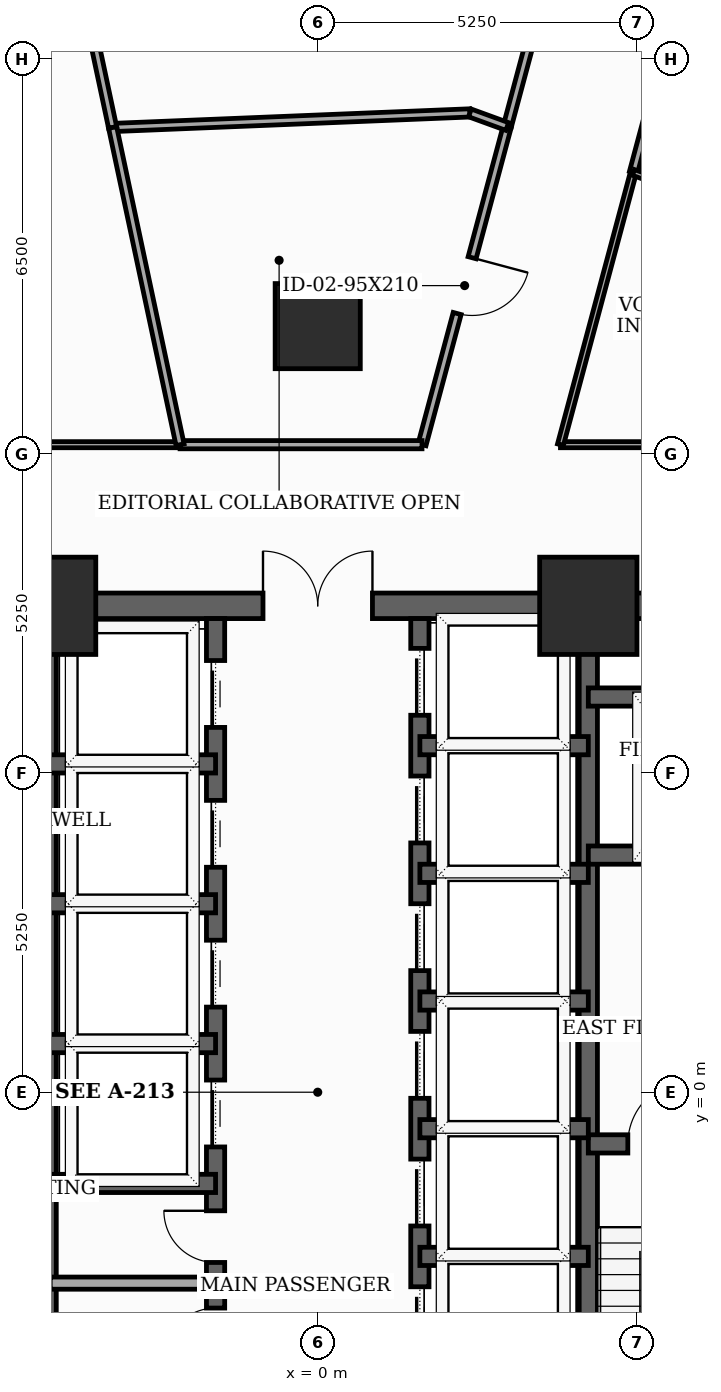
"""IFC4 building model, lengths in metres.
Left out: names, types, materials, properties, quantities, classifications, styles, units other than length and angle.
Written with IfcOpenShell. Run it as: python <this file> out.ifc"""

import sys

from ifc_helpers import new_model, si_unit, direction, frame, frame_2d, origin, origin_2d, place, context, subcontext, project, spatial, rectangle, extrude, element, fill, save


model = new_model("IFC4")
c1 = context("Model", 3, precision=1e-05, world=origin(), true_north=direction((0.0, 1.0)))
c2 = subcontext(c1, "Body", "Model", "MODEL_VIEW")
j1 = project(units=[si_unit("LENGTHUNIT", "METRE"), si_unit("PLANEANGLEUNIT", "RADIAN")], contexts=[c1])
p1 = place(None, origin())
s1 = spatial("IfcSite", under=j1, at=p1, CompositionType="ELEMENT")
p2 = place(p1, origin())
s2 = spatial("IfcBuilding", under=s1, at=p2, CompositionType="ELEMENT")
p3 = place(p2, frame((0.0, 0.0, 51.9)))
s3 = spatial("IfcBuildingStorey", under=s2, at=p3, CompositionType="ELEMENT", Elevation=51.9)
for number, where, z_axis, x_axis in (
    (1, (4.45, 8.0, 0.0), (0.0, 0.0, 1.0), (1.0, 0.0, 0.0)),
    (2, (-4.45, 8.0, 0.0), (0.0, 0.0, 1.0), (1.0, 0.0, 0.0)),
):
    element("IfcColumn", number, at=place(p3, frame(where, z_axis=z_axis, x_axis=x_axis)), inside=s3, PredefinedType="COLUMN", context=c2, shape_type="SweptSolid", body=[
        extrude(rectangle(XDim=1.6, YDim=1.6, at=origin_2d()), origin(), (0.0, 0.0, 1.0), 3.7),
    ])
p4 = place(p3, frame((0.0, 12.6, 0.0), z_axis=(0.0, 0.0, 1.0), x_axis=(1.0, 0.0, 0.0)))
e3 = element("IfcColumn", 3, at=p4, inside=s3, PredefinedType="COLUMN", context=c2, shape_type="SweptSolid", body=[
    extrude(rectangle(XDim=1.4, YDim=1.4, at=origin_2d()), origin(), (0.0, 0.0, 1.0), 3.7),
])
p5 = place(p3, frame((-8.0, 8.0, 0.0), z_axis=(0.0, 0.0, 1.0), x_axis=(1.0, 0.0, 0.0)))
e4 = element("IfcWall", 4, at=p5, inside=s3, PredefinedType="SHEAR", context=c2, shape_type="SweptSolid", body=[
    extrude(rectangle(XDim=16.0, YDim=0.42, at=frame_2d((8.0, 0.0))), origin(), (0.0, 0.0, 1.0), 3.5),
])
p6 = place(p5, frame((7.1, 0.0, 0.0)))
e5 = element("IfcOpeningElement", 5, at=p6, cuts=e4, PredefinedType="OPENING", context=c2, shape_type="SweptSolid", body=[
    extrude(rectangle(XDim=1.8, YDim=2.15, at=frame_2d((0.9, 1.075))), frame((0.0, 0.22, 0.0), z_axis=(0.0, -1.0, 0.0), x_axis=(1.0, 0.0, 0.0)), (0.0, 0.0, 1.0), 0.44),
])
for number, where, z_axis, x_axis in (
    (6, (-4.45, -7.79, 0.0), (0.0, 0.0, 1.0), (0.0, 1.0, 0.0)),
    (7, (4.45, -7.79, 0.0), (0.0, 0.0, 1.0), (0.0, 1.0, 0.0)),
):
    element("IfcWall", number, at=place(p3, frame(where, z_axis=z_axis, x_axis=x_axis)), inside=s3, PredefinedType="SHEAR", context=c2, shape_type="SweptSolid", body=[
        extrude(rectangle(XDim=15.58, YDim=0.3, at=frame_2d((7.79, 0.0))), origin(), (0.0, 0.0, 1.0), 3.5),
    ])
p7 = place(p3, frame((4.45, -0.85, 0.0), z_axis=(0.0, 0.0, 1.0), x_axis=(1.0, 0.0, 0.0)))
e8 = element("IfcWall", 8, at=p7, inside=s3, PredefinedType="SHEAR", context=c2, shape_type="SweptSolid", body=[
    extrude(rectangle(XDim=3.34, YDim=0.3, at=frame_2d((1.67, 0.0))), origin(), (0.0, 0.0, 1.0), 3.5),
])
p8 = place(p7, frame((0.65, 0.0, 0.0)))
e9 = element("IfcOpeningElement", 9, at=p8, cuts=e8, PredefinedType="OPENING", context=c2, shape_type="SweptSolid", body=[
    extrude(rectangle(XDim=1.05, YDim=2.15, at=frame_2d((0.525, 1.075))), frame((0.0, 0.16, 0.0), z_axis=(0.0, -1.0, 0.0), x_axis=(1.0, 0.0, 0.0)), (0.0, 0.0, 1.0), 0.32),
])
p9 = place(p3, frame((4.45, 3.9, 0.0), z_axis=(0.0, 0.0, 1.0), x_axis=(1.0, 0.0, 0.0)))
e10 = element("IfcWall", 10, at=p9, inside=s3, PredefinedType="SHEAR", context=c2, shape_type="SweptSolid", body=[
    extrude(rectangle(XDim=3.34, YDim=0.3, at=frame_2d((1.67, 0.0))), origin(), (0.0, 0.0, 1.0), 3.5),
])
p10 = place(p9, frame((1.18, 0.0, 0.0)))
e11 = element("IfcOpeningElement", 11, at=p10, cuts=e10, PredefinedType="OPENING", context=c2, shape_type="SweptSolid", body=[
    extrude(rectangle(XDim=1.1, YDim=2.1, at=frame_2d((0.55, 1.05))), frame((0.0, 0.16, 0.0), z_axis=(0.0, -1.0, 0.0), x_axis=(1.0, 0.0, 0.0)), (0.0, 0.0, 1.0), 0.32),
])
p11 = place(p3, frame((4.45, 6.5, 0.0), z_axis=(0.0, 0.0, 1.0), x_axis=(1.0, 0.0, 0.0)))
e12 = element("IfcWall", 12, at=p11, inside=s3, PredefinedType="SHEAR", context=c2, shape_type="SweptSolid", body=[
    extrude(rectangle(XDim=3.34, YDim=0.3, at=frame_2d((1.67, 0.0))), origin(), (0.0, 0.0, 1.0), 3.5),
])
p12 = place(p3, frame((-1.68, -4.85, 0.0), z_axis=(0.0, 0.0, 1.0), x_axis=(0.0, 1.0, 0.0)))
e13 = element("IfcWall", 13, at=p12, inside=s3, PredefinedType="SHEAR", context=c2, shape_type="SweptSolid", body=[
    extrude(rectangle(XDim=12.64, YDim=0.3, at=frame_2d((6.32, 0.0))), origin(), (0.0, 0.0, 1.0), 3.5),
])
p13 = place(p12, frame((3.95, 0.0, 0.0)))
e14 = element("IfcOpeningElement", 14, at=p13, cuts=e13, PredefinedType="OPENING", context=c2, shape_type="SweptSolid", body=[
    extrude(rectangle(XDim=1.1, YDim=2.1, at=frame_2d((0.55, 1.05))), frame((0.0, 0.16, 0.0), z_axis=(0.0, -1.0, 0.0), x_axis=(1.0, 0.0, 0.0)), (0.0, 0.0, 1.0), 0.32),
])
p14 = place(p12, frame((6.25, 0.0, 0.0)))
e15 = element("IfcOpeningElement", 15, at=p14, cuts=e13, PredefinedType="OPENING", context=c2, shape_type="SweptSolid", body=[
    extrude(rectangle(XDim=1.1, YDim=2.1, at=frame_2d((0.55, 1.05))), frame((0.0, 0.16, 0.0), z_axis=(0.0, -1.0, 0.0), x_axis=(1.0, 0.0, 0.0)), (0.0, 0.0, 1.0), 0.32),
])
p15 = place(p12, frame((8.55, 0.0, 0.0)))
e16 = element("IfcOpeningElement", 16, at=p15, cuts=e13, PredefinedType="OPENING", context=c2, shape_type="SweptSolid", body=[
    extrude(rectangle(XDim=1.1, YDim=2.1, at=frame_2d((0.55, 1.05))), frame((0.0, 0.16, 0.0), z_axis=(0.0, -1.0, 0.0), x_axis=(1.0, 0.0, 0.0)), (0.0, 0.0, 1.0), 0.32),
])
p16 = place(p12, frame((10.85, 0.0, 0.0)))
e17 = element("IfcOpeningElement", 17, at=p16, cuts=e13, PredefinedType="OPENING", context=c2, shape_type="SweptSolid", body=[
    extrude(rectangle(XDim=1.1, YDim=2.1, at=frame_2d((0.55, 1.05))), frame((0.0, 0.16, 0.0), z_axis=(0.0, -1.0, 0.0), x_axis=(1.0, 0.0, 0.0)), (0.0, 0.0, 1.0), 0.32),
])
p17 = place(p12, frame((0.45, 0.0, 0.0)))
e18 = element("IfcOpeningElement", 18, at=p17, cuts=e13, PredefinedType="OPENING", context=c2, shape_type="SweptSolid", body=[
    extrude(rectangle(XDim=0.85, YDim=2.02, at=frame_2d((0.425, 1.01))), frame((0.0, 0.16, 0.0), z_axis=(0.0, -1.0, 0.0), x_axis=(1.0, 0.0, 0.0)), (0.0, 0.0, 1.0), 0.32),
])
p18 = place(p12, frame((2.05, 0.0, 0.0)))
e19 = element("IfcOpeningElement", 19, at=p18, cuts=e13, PredefinedType="OPENING", context=c2, shape_type="SweptSolid", body=[
    extrude(rectangle(XDim=0.85, YDim=2.02, at=frame_2d((0.425, 1.01))), frame((0.0, 0.16, 0.0), z_axis=(0.0, -1.0, 0.0), x_axis=(1.0, 0.0, 0.0)), (0.0, 0.0, 1.0), 0.32),
])
p19 = place(p3, frame((1.68, -4.85, 0.0), z_axis=(0.0, 0.0, 1.0), x_axis=(0.0, 1.0, 0.0)))
e20 = element("IfcWall", 20, at=p19, inside=s3, PredefinedType="SHEAR", context=c2, shape_type="SweptSolid", body=[
    extrude(rectangle(XDim=12.64, YDim=0.3, at=frame_2d((6.32, 0.0))), origin(), (0.0, 0.0, 1.0), 3.5),
])
p20 = place(p19, frame((0.55, 0.0, 0.0)))
e21 = element("IfcOpeningElement", 21, at=p20, cuts=e20, PredefinedType="OPENING", context=c2, shape_type="SweptSolid", body=[
    extrude(rectangle(XDim=1.1, YDim=2.1, at=frame_2d((0.55, 1.05))), frame((0.0, 0.16, 0.0), z_axis=(0.0, -1.0, 0.0), x_axis=(1.0, 0.0, 0.0)), (0.0, 0.0, 1.0), 0.32),
])
p21 = place(p19, frame((2.65, 0.0, 0.0)))
e22 = element("IfcOpeningElement", 22, at=p21, cuts=e20, PredefinedType="OPENING", context=c2, shape_type="SweptSolid", body=[
    extrude(rectangle(XDim=1.1, YDim=2.1, at=frame_2d((0.55, 1.05))), frame((0.0, 0.16, 0.0), z_axis=(0.0, -1.0, 0.0), x_axis=(1.0, 0.0, 0.0)), (0.0, 0.0, 1.0), 0.32),
])
p22 = place(p19, frame((4.75, 0.0, 0.0)))
e23 = element("IfcOpeningElement", 23, at=p22, cuts=e20, PredefinedType="OPENING", context=c2, shape_type="SweptSolid", body=[
    extrude(rectangle(XDim=1.1, YDim=2.1, at=frame_2d((0.55, 1.05))), frame((0.0, 0.16, 0.0), z_axis=(0.0, -1.0, 0.0), x_axis=(1.0, 0.0, 0.0)), (0.0, 0.0, 1.0), 0.32),
])
p23 = place(p19, frame((6.85, 0.0, 0.0)))
e24 = element("IfcOpeningElement", 24, at=p23, cuts=e20, PredefinedType="OPENING", context=c2, shape_type="SweptSolid", body=[
    extrude(rectangle(XDim=1.1, YDim=2.1, at=frame_2d((0.55, 1.05))), frame((0.0, 0.16, 0.0), z_axis=(0.0, -1.0, 0.0), x_axis=(1.0, 0.0, 0.0)), (0.0, 0.0, 1.0), 0.32),
])
p24 = place(p19, frame((8.95, 0.0, 0.0)))
e25 = element("IfcOpeningElement", 25, at=p24, cuts=e20, PredefinedType="OPENING", context=c2, shape_type="SweptSolid", body=[
    extrude(rectangle(XDim=1.1, YDim=2.1, at=frame_2d((0.55, 1.05))), frame((0.0, 0.16, 0.0), z_axis=(0.0, -1.0, 0.0), x_axis=(1.0, 0.0, 0.0)), (0.0, 0.0, 1.0), 0.32),
])
p25 = place(p19, frame((11.05, 0.0, 0.0)))
e26 = element("IfcOpeningElement", 26, at=p25, cuts=e20, PredefinedType="OPENING", context=c2, shape_type="SweptSolid", body=[
    extrude(rectangle(XDim=1.1, YDim=2.1, at=frame_2d((0.55, 1.05))), frame((0.0, 0.16, 0.0), z_axis=(0.0, -1.0, 0.0), x_axis=(1.0, 0.0, 0.0)), (0.0, 0.0, 1.0), 0.32),
])
for number, where, z_axis, x_axis in (
    (27, (-4.45, -1.5, 0.0), (0.0, 0.0, 1.0), (1.0, 0.0, 0.0)),
    (28, (-4.45, 0.8, 0.0), (0.0, 0.0, 1.0), (1.0, 0.0, 0.0)),
    (29, (-4.45, 3.1, 0.0), (0.0, 0.0, 1.0), (1.0, 0.0, 0.0)),
    (30, (-4.45, 5.4, 0.0), (0.0, 0.0, 1.0), (1.0, 0.0, 0.0)),
    (31, (1.68, 1.5, 0.0), (0.0, 0.0, 1.0), (1.0, 0.0, 0.0)),
    (32, (1.68, 3.6, 0.0), (0.0, 0.0, 1.0), (1.0, 0.0, 0.0)),
    (33, (1.68, 5.7, 0.0), (0.0, 0.0, 1.0), (1.0, 0.0, 0.0)),
    (34, (1.68, -2.7, 0.0), (0.0, 0.0, 1.0), (1.0, 0.0, 0.0)),
    (35, (1.68, -0.6, 0.0), (0.0, 0.0, 1.0), (1.0, 0.0, 0.0)),
):
    element("IfcWall", number, at=place(p3, frame(where, z_axis=z_axis, x_axis=x_axis)), inside=s3, PredefinedType="SHEAR", context=c2, shape_type="SweptSolid", body=[
        extrude(rectangle(XDim=2.77, YDim=0.3, at=frame_2d((1.385, 0.0))), origin(), (0.0, 0.0, 1.0), 3.5),
    ])
p26 = place(p3, frame((-4.4, -3.14, 0.0), z_axis=(0.0, 0.0, 1.0), x_axis=(1.0, 0.0, 0.0)))
e36 = element("IfcWall", 36, at=p26, inside=s3, PredefinedType="SOLIDWALL", context=c2, shape_type="SweptSolid", body=[
    extrude(rectangle(XDim=2.68, YDim=0.2, at=frame_2d((1.34, 0.0))), origin(), (0.0, 0.0, 1.0), 3.5),
])
p27 = place(p3, frame((10.15, 10.65, 0.0), z_axis=(0.0, 0.0, 1.0), x_axis=(-1.0, 0.0, 0.0)))
e37 = element("IfcWall", 37, at=p27, inside=s3, PredefinedType="MOVABLE", context=c2, shape_type="SweptSolid", body=[
    extrude(rectangle(XDim=6.158, YDim=0.1, at=frame_2d((3.079, 0.0))), origin(), (0.0, 0.0, 1.0), 2.085),
])
p28 = place(p27, frame((0.757, 0.0, 0.0)))
e38 = element("IfcOpeningElement", 38, at=p28, cuts=e37, PredefinedType="OPENING", context=c2, shape_type="SweptSolid", body=[
    extrude(rectangle(XDim=0.95, YDim=2.035, at=frame_2d((0.475, 1.018))), frame((0.0, 0.06, 0.0), z_axis=(0.0, -1.0, 0.0), x_axis=(1.0, 0.0, 0.0)), (0.0, 0.0, 1.0), 0.12),
])
p29 = place(p3, frame((3.992, 10.65, 0.0), z_axis=(0.0, 0.0, 1.0), x_axis=(0.258832601786, 0.965922193685, 0.0)))
e39 = element("IfcWall", 39, at=p29, inside=s3, PredefinedType="MOVABLE", context=c2, shape_type="SweptSolid", body=[
    extrude(rectangle(XDim=4.636, YDim=0.1, at=frame_2d((2.318, 0.0))), origin(), (0.0, 0.0, 1.0), 2.085),
])
p30 = place(p3, frame((5.192, 15.128, 0.0), z_axis=(0.0, 0.0, 1.0), x_axis=(0.258929564275, 0.965896205989, 0.0)))
e40 = element("IfcWall", 40, at=p30, inside=s3, PredefinedType="PARTITIONING", context=c2, shape_type="SweptSolid", body=[
    extrude(rectangle(XDim=6.644, YDim=0.135, at=frame_2d((3.322, 0.0))), origin(), (0.0, 0.0, 1.0), 2.085),
])
p31 = place(p30, frame((2.847, 0.0, 0.0)))
e41 = element("IfcOpeningElement", 41, at=p31, cuts=e40, PredefinedType="OPENING", context=c2, shape_type="SweptSolid", body=[
    extrude(rectangle(XDim=0.95, YDim=2.035, at=frame_2d((0.475, 1.018))), frame((0.0, 0.077, 0.0), z_axis=(0.0, -1.0, 0.0), x_axis=(1.0, 0.0, 0.0)), (0.0, 0.0, 1.0), 0.155),
])
p32 = place(p3, frame((4.787, 22.115, 0.0), z_axis=(0.0, 0.0, 1.0), x_axis=(-0.25886596283, -0.965913253501, 0.0)))
e42 = element("IfcWall", 42, at=p32, inside=s3, PredefinedType="PARTITIONING", context=c2, shape_type="SweptSolid", body=[
    extrude(rectangle(XDim=6.452, YDim=0.135, at=frame_2d((3.226, 0.0))), origin(), (0.0, 0.0, 1.0), 2.085),
])
p33 = place(p3, frame((3.117, 15.883, 0.0), z_axis=(0.0, 0.0, 1.0), x_axis=(-0.258756357845, -0.965942621109, 0.0)))
e43 = element("IfcWall", 43, at=p33, inside=s3, PredefinedType="PARTITIONING", context=c2, shape_type="SweptSolid", body=[
    extrude(rectangle(XDim=5.418, YDim=0.135, at=frame_2d((2.709, 0.0))), origin(), (0.0, 0.0, 1.0), 2.785),
])
p34 = place(p33, frame((2.234, 0.0, 0.0)))
e44 = element("IfcOpeningElement", 44, at=p34, cuts=e43, PredefinedType="OPENING", context=c2, shape_type="SweptSolid", body=[
    extrude(rectangle(XDim=0.95, YDim=2.1, at=frame_2d((0.475, 1.05))), frame((0.0, 0.077, 0.0), z_axis=(0.0, -1.0, 0.0), x_axis=(1.0, 0.0, 0.0)), (0.0, 0.0, 1.0), 0.155),
])
p35 = place(p3, frame((1.715, 10.65, 0.0), z_axis=(0.0, 0.0, 1.0), x_axis=(-1.0, 0.0, 0.0)))
e45 = element("IfcWall", 45, at=p35, inside=s3, PredefinedType="PARTITIONING", context=c2, shape_type="SweptSolid", body=[
    extrude(rectangle(XDim=3.979, YDim=0.135, at=frame_2d((1.99, 0.0))), origin(), (0.0, 0.0, 1.0), 2.785),
])
p36 = place(p3, frame((-2.264, 10.65, 0.0), z_axis=(0.0, 0.0, 1.0), x_axis=(-1.0, 0.0, 0.0)))
e46 = element("IfcWall", 46, at=p36, inside=s3, PredefinedType="MOVABLE", context=c2, shape_type="SweptSolid", body=[
    extrude(rectangle(XDim=7.886, YDim=0.1, at=frame_2d((3.943, 0.0))), origin(), (0.0, 0.0, 1.0), 2.085),
])
p37 = place(p3, frame((8.436, 13.947, 0.0), z_axis=(0.0, 0.0, 1.0), x_axis=(-0.939679812385, 0.342055332067, 0.0)))
e47 = element("IfcWall", 47, at=p37, inside=s3, PredefinedType="MOVABLE", context=c2, shape_type="SweptSolid", body=[
    extrude(rectangle(XDim=3.452, YDim=0.1, at=frame_2d((1.726, 0.0))), origin(), (0.0, 0.0, 1.0), 2.085),
])
p38 = place(p3, frame((-3.373, 15.867, 0.0), z_axis=(0.0, 0.0, 1.0), x_axis=(0.999166982533, 0.040808589988, 0.0)))
e48 = element("IfcWall", 48, at=p38, inside=s3, PredefinedType="PARTITIONING", context=c2, shape_type="SweptSolid", body=[
    extrude(rectangle(XDim=5.881, YDim=0.135, at=frame_2d((2.94, 0.0))), origin(), (0.0, 0.0, 1.0), 2.085),
])
p39 = place(p3, frame((2.503, 16.107, 0.0), z_axis=(0.0, 0.0, 1.0), x_axis=(0.93949859082, -0.342552766514, 0.0)))
e49 = element("IfcWall", 49, at=p39, inside=s3, PredefinedType="PARTITIONING", context=c2, shape_type="SweptSolid", body=[
    extrude(rectangle(XDim=0.654, YDim=0.135, at=frame_2d((0.327, 0.0))), origin(), (0.0, 0.0, 1.0), 3.5),
])
p40 = place(p3, frame((-5.854, 27.535, 0.0), z_axis=(0.0, 0.0, 1.0), x_axis=(0.207936838286, -0.978142255137, 0.0)))
e50 = element("IfcWall", 50, at=p40, inside=s3, PredefinedType="PARTITIONING", context=c2, shape_type="SweptSolid", body=[
    extrude(rectangle(XDim=11.929, YDim=0.135, at=frame_2d((5.964, 0.0))), origin(), (0.0, 0.0, 1.0), 2.085),
])
p41 = place(p3, frame((-3.373, 15.867, 0.0), z_axis=(0.0, 0.0, 1.0), x_axis=(0.20795017925, -0.978139418974, 0.0)))
e51 = element("IfcWall", 51, at=p41, inside=s3, PredefinedType="PARTITIONING", context=c2, shape_type="SweptSolid", body=[
    extrude(rectangle(XDim=5.334, YDim=0.135, at=frame_2d((2.667, 0.0))), origin(), (0.0, 0.0, 1.0), 2.785),
])
p42 = place(p6, origin())
e52 = element("IfcDoor", 52, at=p42, inside=s3, OperationType="DOUBLE_DOOR_SINGLE_SWING", PredefinedType="DOOR", context=c2, shape_type="SweptSolid", body=[
    extrude(rectangle(XDim=1.8, YDim=2.15, at=frame_2d((0.9, 1.075))), frame((0.0, 0.025, 0.0), z_axis=(0.0, -1.0, 0.0), x_axis=(1.0, 0.0, 0.0)), (0.0, 0.0, 1.0), 0.05),
])
fill(e5, e52)
p43 = place(p8, origin())
e53 = element("IfcDoor", 53, at=p43, inside=s3, OperationType="SINGLE_SWING_RIGHT", PredefinedType="DOOR", context=c2, shape_type="SweptSolid", body=[
    extrude(rectangle(XDim=1.05, YDim=2.15, at=frame_2d((0.525, 1.075))), frame((0.0, 0.025, 0.0), z_axis=(0.0, -1.0, 0.0), x_axis=(1.0, 0.0, 0.0)), (0.0, 0.0, 1.0), 0.05),
])
fill(e9, e53)
p44 = place(p13, origin())
e54 = element("IfcDoor", 54, at=p44, inside=s3, OperationType="SLIDING_TO_LEFT", PredefinedType="DOOR", context=c2, shape_type="SweptSolid", body=[
    extrude(rectangle(XDim=1.1, YDim=2.1, at=frame_2d((0.55, 1.05))), frame((0.0, 0.025, 0.0), z_axis=(0.0, -1.0, 0.0), x_axis=(1.0, 0.0, 0.0)), (0.0, 0.0, 1.0), 0.05),
])
fill(e14, e54)
p45 = place(p14, origin())
e55 = element("IfcDoor", 55, at=p45, inside=s3, OperationType="SLIDING_TO_LEFT", PredefinedType="DOOR", context=c2, shape_type="SweptSolid", body=[
    extrude(rectangle(XDim=1.1, YDim=2.1, at=frame_2d((0.55, 1.05))), frame((0.0, 0.025, 0.0), z_axis=(0.0, -1.0, 0.0), x_axis=(1.0, 0.0, 0.0)), (0.0, 0.0, 1.0), 0.05),
])
fill(e15, e55)
p46 = place(p15, origin())
e56 = element("IfcDoor", 56, at=p46, inside=s3, OperationType="SLIDING_TO_LEFT", PredefinedType="DOOR", context=c2, shape_type="SweptSolid", body=[
    extrude(rectangle(XDim=1.1, YDim=2.1, at=frame_2d((0.55, 1.05))), frame((0.0, 0.025, 0.0), z_axis=(0.0, -1.0, 0.0), x_axis=(1.0, 0.0, 0.0)), (0.0, 0.0, 1.0), 0.05),
])
fill(e16, e56)
p47 = place(p16, origin())
e57 = element("IfcDoor", 57, at=p47, inside=s3, OperationType="SLIDING_TO_LEFT", PredefinedType="DOOR", context=c2, shape_type="SweptSolid", body=[
    extrude(rectangle(XDim=1.1, YDim=2.1, at=frame_2d((0.55, 1.05))), frame((0.0, 0.025, 0.0), z_axis=(0.0, -1.0, 0.0), x_axis=(1.0, 0.0, 0.0)), (0.0, 0.0, 1.0), 0.05),
])
fill(e17, e57)
p48 = place(p17, origin())
e58 = element("IfcDoor", 58, at=p48, inside=s3, OperationType="SINGLE_SWING_LEFT", PredefinedType="TRAPDOOR", context=c2, shape_type="SweptSolid", body=[
    extrude(rectangle(XDim=0.85, YDim=2.02, at=frame_2d((0.425, 1.01))), frame((0.0, 0.025, 0.0), z_axis=(0.0, -1.0, 0.0), x_axis=(1.0, 0.0, 0.0)), (0.0, 0.0, 1.0), 0.05),
])
fill(e18, e58)
p49 = place(p18, origin())
e59 = element("IfcDoor", 59, at=p49, inside=s3, OperationType="SINGLE_SWING_RIGHT", PredefinedType="TRAPDOOR", context=c2, shape_type="SweptSolid", body=[
    extrude(rectangle(XDim=0.85, YDim=2.02, at=frame_2d((0.425, 1.01))), frame((0.0, 0.025, 0.0), z_axis=(0.0, -1.0, 0.0), x_axis=(1.0, 0.0, 0.0)), (0.0, 0.0, 1.0), 0.05),
])
fill(e19, e59)
p50 = place(p20, origin())
e60 = element("IfcDoor", 60, at=p50, inside=s3, OperationType="SLIDING_TO_LEFT", PredefinedType="DOOR", context=c2, shape_type="SweptSolid", body=[
    extrude(rectangle(XDim=1.1, YDim=2.1, at=frame_2d((0.55, 1.05))), frame((0.0, 0.025, 0.0), z_axis=(0.0, -1.0, 0.0), x_axis=(1.0, 0.0, 0.0)), (0.0, 0.0, 1.0), 0.05),
])
fill(e21, e60)
p51 = place(p21, origin())
e61 = element("IfcDoor", 61, at=p51, inside=s3, OperationType="SLIDING_TO_LEFT", PredefinedType="DOOR", context=c2, shape_type="SweptSolid", body=[
    extrude(rectangle(XDim=1.1, YDim=2.1, at=frame_2d((0.55, 1.05))), frame((0.0, 0.025, 0.0), z_axis=(0.0, -1.0, 0.0), x_axis=(1.0, 0.0, 0.0)), (0.0, 0.0, 1.0), 0.05),
])
fill(e22, e61)
p52 = place(p22, origin())
e62 = element("IfcDoor", 62, at=p52, inside=s3, OperationType="SLIDING_TO_LEFT", PredefinedType="DOOR", context=c2, shape_type="SweptSolid", body=[
    extrude(rectangle(XDim=1.1, YDim=2.1, at=frame_2d((0.55, 1.05))), frame((0.0, 0.025, 0.0), z_axis=(0.0, -1.0, 0.0), x_axis=(1.0, 0.0, 0.0)), (0.0, 0.0, 1.0), 0.05),
])
fill(e23, e62)
p53 = place(p23, origin())
e63 = element("IfcDoor", 63, at=p53, inside=s3, OperationType="SLIDING_TO_LEFT", PredefinedType="DOOR", context=c2, shape_type="SweptSolid", body=[
    extrude(rectangle(XDim=1.1, YDim=2.1, at=frame_2d((0.55, 1.05))), frame((0.0, 0.025, 0.0), z_axis=(0.0, -1.0, 0.0), x_axis=(1.0, 0.0, 0.0)), (0.0, 0.0, 1.0), 0.05),
])
fill(e24, e63)
p54 = place(p24, origin())
e64 = element("IfcDoor", 64, at=p54, inside=s3, OperationType="SLIDING_TO_LEFT", PredefinedType="DOOR", context=c2, shape_type="SweptSolid", body=[
    extrude(rectangle(XDim=1.1, YDim=2.1, at=frame_2d((0.55, 1.05))), frame((0.0, 0.025, 0.0), z_axis=(0.0, -1.0, 0.0), x_axis=(1.0, 0.0, 0.0)), (0.0, 0.0, 1.0), 0.05),
])
fill(e25, e64)
p55 = place(p25, origin())
e65 = element("IfcDoor", 65, at=p55, inside=s3, OperationType="SLIDING_TO_LEFT", PredefinedType="DOOR", context=c2, shape_type="SweptSolid", body=[
    extrude(rectangle(XDim=1.1, YDim=2.1, at=frame_2d((0.55, 1.05))), frame((0.0, 0.025, 0.0), z_axis=(0.0, -1.0, 0.0), x_axis=(1.0, 0.0, 0.0)), (0.0, 0.0, 1.0), 0.05),
])
fill(e26, e65)
p56 = place(p34, origin())
e66 = element("IfcDoor", 66, at=p56, inside=s3, OperationType="SINGLE_SWING_LEFT", PredefinedType="DOOR", context=c2, shape_type="SweptSolid", body=[
    extrude(rectangle(XDim=0.95, YDim=2.1, at=frame_2d((0.475, 1.05))), frame((0.0, 0.025, 0.0), z_axis=(0.0, -1.0, 0.0), x_axis=(1.0, 0.0, 0.0)), (0.0, 0.0, 1.0), 0.05),
])
fill(e44, e66)
save(model, sys.argv[1])
